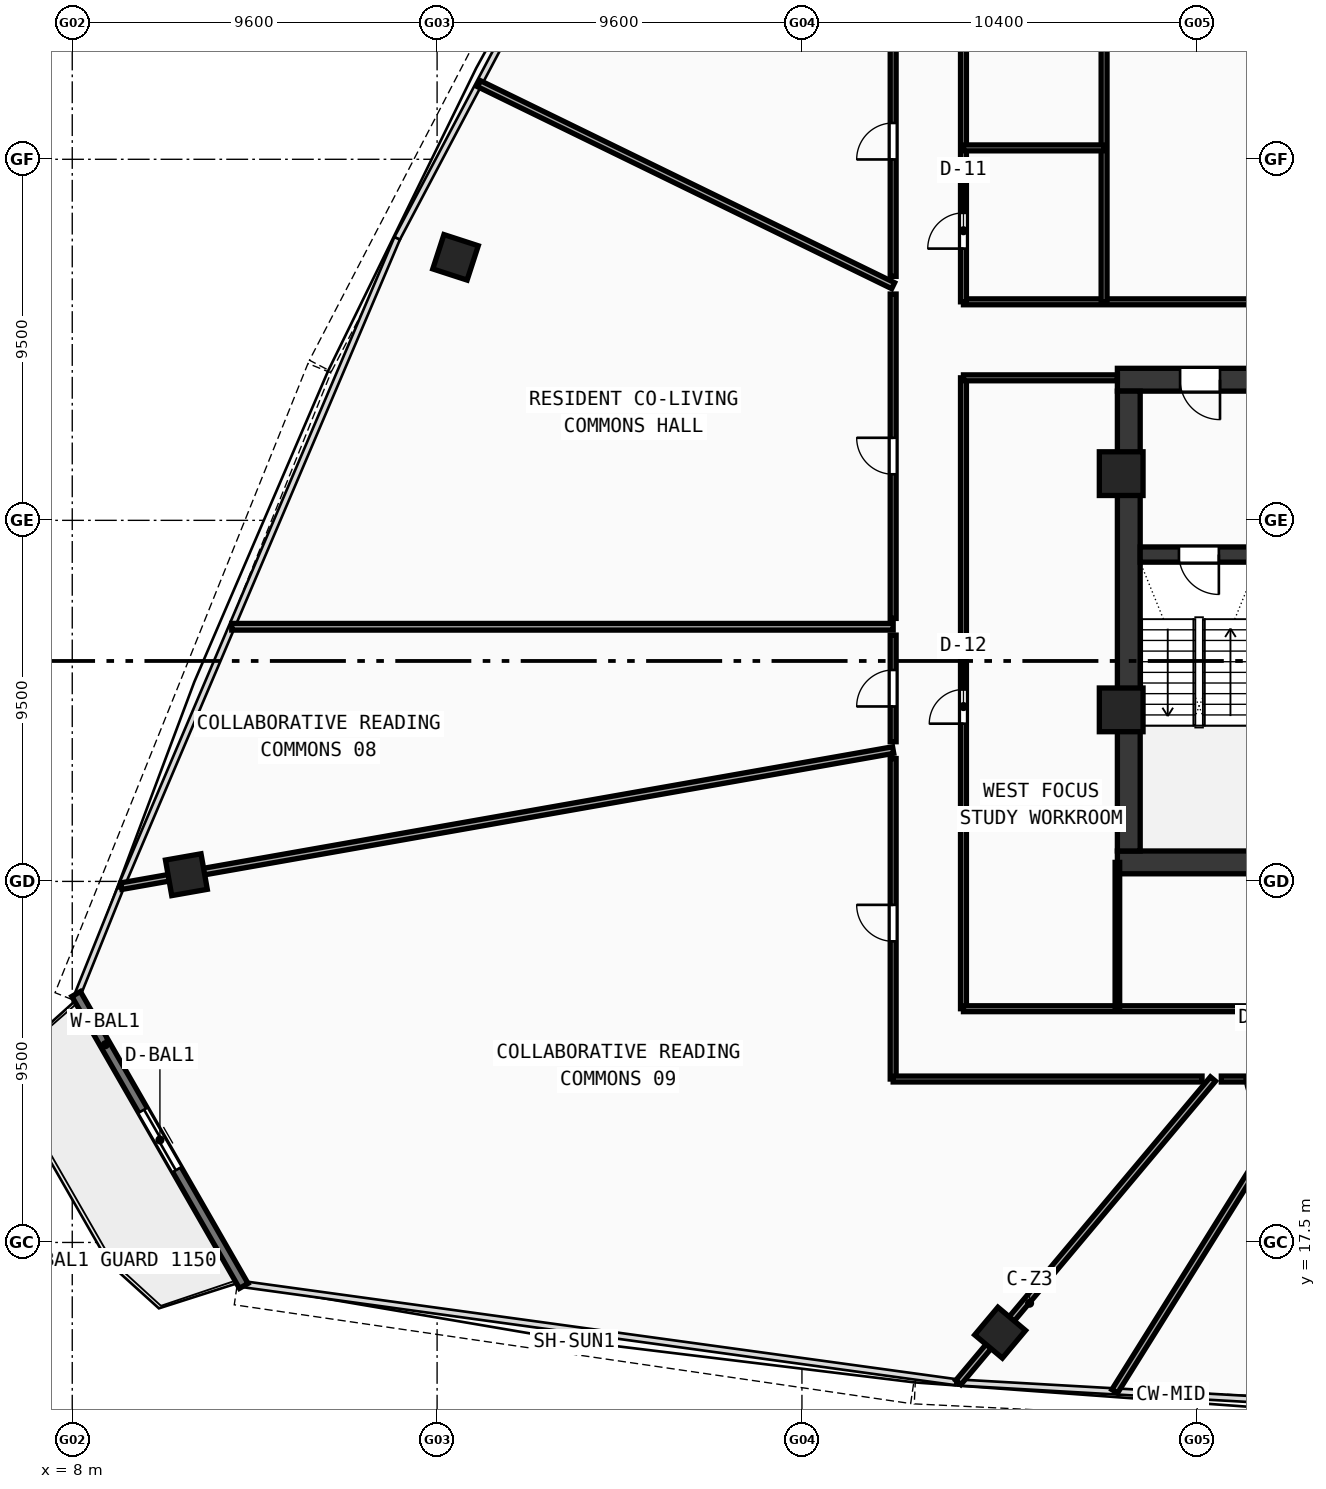
"""IFC4 building model, lengths in metres.
Left out: names, types, materials, properties, quantities, classifications, styles, units other than length and angle.
Written with IfcOpenShell. Run it as: python <this file> out.ifc"""

import sys

from ifc_helpers import new_model, si_unit, direction, frame, frame_2d, origin, origin_with_axes, origin_2d, place, context, subcontext, project, spatial, rectangle, hollow_rectangle, extrude, source, transform, mapped, element, fill, save


model = new_model("IFC4")
c1 = context("Model", 3, precision=1e-05, world=origin(), true_north=direction((0.0, 1.0)))
c2 = subcontext(c1, "Body", "Model", "MODEL_VIEW")
j1 = project(units=[si_unit("LENGTHUNIT", "METRE"), si_unit("PLANEANGLEUNIT", "RADIAN")], contexts=[c1])
p1 = place(None, origin())
s1 = spatial("IfcSite", under=j1, at=p1, CompositionType="ELEMENT")
p2 = place(p1, origin())
s2 = spatial("IfcBuilding", under=s1, at=p2, CompositionType="ELEMENT")
p3 = place(p2, frame((0.0, 0.0, 148.23)))
s3 = spatial("IfcBuildingStorey", under=s2, at=p3, CompositionType="ELEMENT", Elevation=148.23)
p4 = place(p3, frame((35.5, 27.5, 0.0), z_axis=(0.0, 0.0, 1.0), x_axis=(1.0, 0.0, 0.0)))
e1 = element("IfcWall", 1, at=p4, inside=s3, PredefinedType="SHEAR", context=c2, shape_type="SweptSolid", body=[
    extrude(rectangle(XDim=25.0, YDim=0.6, at=frame_2d((12.5, 0.0))), origin(), (0.0, 0.0, 1.0), 3.42),
])
p5 = place(p3, frame((35.5, 40.2, 0.0), z_axis=(0.0, 0.0, 1.0), x_axis=(1.0, 0.0, 0.0)))
e2 = element("IfcWall", 2, at=p5, inside=s3, PredefinedType="SHEAR", context=c2, shape_type="SweptSolid", body=[
    extrude(rectangle(XDim=11.3, YDim=0.6, at=frame_2d((5.65, 0.0))), origin(), (0.0, 0.0, 1.0), 3.42),
])
p6 = place(p5, frame((1.65, 0.0, 0.0)))
e3 = element("IfcOpeningElement", 3, at=p6, cuts=e2, PredefinedType="OPENING", context=c2, shape_type="SweptSolid", body=[
    extrude(rectangle(XDim=1.05, YDim=2.1, at=frame_2d((0.525, 1.05))), frame((0.0, 0.31, 0.0), z_axis=(0.0, -1.0, 0.0), x_axis=(1.0, 0.0, 0.0)), (0.0, 0.0, 1.0), 0.62),
])
p7 = place(p3, frame((35.8, 27.8, 0.0), z_axis=(0.0, 0.0, 1.0), x_axis=(0.0, 1.0, 0.0)))
e4 = element("IfcWall", 4, at=p7, inside=s3, PredefinedType="SHEAR", context=c2, shape_type="SweptSolid", body=[
    extrude(rectangle(XDim=12.1, YDim=0.6, at=frame_2d((6.05, 0.0))), origin(), (0.0, 0.0, 1.0), 3.42),
])
p8 = place(p3, frame((36.1, 35.6, 0.0), z_axis=(0.0, 0.0, 1.0), x_axis=(1.0, 0.0, 0.0)))
e5 = element("IfcWall", 5, at=p8, inside=s3, PredefinedType="SHEAR", context=c2, shape_type="SweptSolid", body=[
    extrude(rectangle(XDim=3.1, YDim=0.4, at=frame_2d((1.55, 0.0))), origin(), (0.0, 0.0, 1.0), 3.42),
])
p9 = place(p8, frame((1.02, 0.0, 0.0)))
e6 = element("IfcOpeningElement", 6, at=p9, cuts=e5, PredefinedType="OPENING", context=c2, shape_type="SweptSolid", body=[
    extrude(rectangle(XDim=1.05, YDim=2.1, at=frame_2d((0.525, 1.05))), frame((0.0, 0.21, 0.0), z_axis=(0.0, -1.0, 0.0), x_axis=(1.0, 0.0, 0.0)), (0.0, 0.0, 1.0), 0.42),
])
m1 = source(origin(), c2, "Body", "SweptSolid", [
    extrude(hollow_rectangle(XDim=1.15, YDim=1.15, WallThickness=0.048, at=origin_2d()), origin(), (0.0, 0.0, 1.0), 3.68),
])
for number, where, z_axis, x_axis in (
    (7, (35.6, 37.729, -0.26), (0.0, 0.0, 1.0), (1.0, 0.0, 0.0)),
    (8, (35.6, 31.513, -0.26), (0.0, 0.0, 1.0), (1.0, 0.0, 0.0)),
):
    element("IfcColumn", number, at=place(p3, frame(where, z_axis=z_axis, x_axis=x_axis)), inside=s3, PredefinedType="COLUMN", context=c2, shape_type="MappedRepresentation", body=[
        mapped(m1, transform((0.0, 0.0, 0.0), scale=1.0)),
    ])
m2 = source(origin(), c2, "Body", "SweptSolid", [
    extrude(hollow_rectangle(XDim=0.95, YDim=0.95, WallThickness=0.04, at=origin_2d()), origin(), (0.0, 0.0, 1.0), 3.68),
])
for number, where, z_axis, x_axis in (
    (9, (32.415, 15.126, -0.26), (0.0, 0.0, 1.0), (0.766, -0.643, 0.0)),
    (10, (18.085, 43.42, -0.26), (0.0, 0.0, 1.0), (-0.309, -0.951, 0.0)),
    (11, (11.003, 27.177, -0.26), (0.0, 0.0, 1.0), (0.174, -0.985, 0.0)),
):
    element("IfcColumn", number, at=place(p3, frame(where, z_axis=z_axis, x_axis=x_axis)), inside=s3, PredefinedType="COLUMN", context=c2, shape_type="MappedRepresentation", body=[
        mapped(m2, transform((0.0, 0.0, 0.0), scale=1.0)),
    ])
p10 = place(p3, frame((8.102, 24.038, 0.0), z_axis=(0.0, 0.0, 1.0), x_axis=(0.497915888941, -0.867225326856, 0.0)))
e12 = element("IfcWall", 12, at=p10, inside=s3, PredefinedType="STANDARD", context=c2, shape_type="SweptSolid", body=[
    extrude(rectangle(XDim=8.858, YDim=0.26, at=frame_2d((4.429, 0.0))), origin(), (0.0, 0.0, 1.0), 3.42),
])
p11 = place(p10, frame((3.529, 0.0, 0.0)))
e13 = element("IfcOpeningElement", 13, at=p11, cuts=e12, PredefinedType="OPENING", context=c2, shape_type="SweptSolid", body=[
    extrude(rectangle(XDim=1.8, YDim=2.15, at=frame_2d((0.9, 1.075))), frame((0.0, 0.14, 0.0), z_axis=(0.0, -1.0, 0.0), x_axis=(1.0, 0.0, 0.0)), (0.0, 0.0, 1.0), 0.28),
])
p12 = place(p3, frame((31.45, 42.25, 0.0), z_axis=(0.0, 0.0, 1.0), x_axis=(1.0, 0.0, 0.0)))
e14 = element("IfcWall", 14, at=p12, inside=s3, PredefinedType="PARTITIONING", context=c2, shape_type="SweptSolid", body=[
    extrude(rectangle(XDim=33.1, YDim=0.155, at=frame_2d((16.55, 0.0))), origin(), (0.0, 0.0, 1.0), 2.77),
])
p13 = place(p3, frame((31.45, 42.25, 0.0), z_axis=(0.0, 0.0, 1.0), x_axis=(0.0, 1.0, 0.0)))
e15 = element("IfcWall", 15, at=p13, inside=s3, PredefinedType="PARTITIONING", context=c2, shape_type="SweptSolid", body=[
    extrude(rectangle(XDim=11.7, YDim=0.155, at=frame_2d((5.85, 0.0))), origin(), (0.0, 0.0, 1.0), 2.77),
])
p14 = place(p13, frame((1.4, 0.0, 0.0)))
e16 = element("IfcOpeningElement", 16, at=p14, cuts=e15, PredefinedType="OPENING", context=c2, shape_type="SweptSolid", body=[
    extrude(rectangle(XDim=0.94, YDim=2.1, at=frame_2d((0.47, 1.05))), frame((0.0, 0.087, 0.0), z_axis=(0.0, -1.0, 0.0), x_axis=(1.0, 0.0, 0.0)), (0.0, 0.0, 1.0), 0.175),
])
p15 = place(p13, frame((6.8, 0.0, 0.0)))
e17 = element("IfcOpeningElement", 17, at=p15, cuts=e15, PredefinedType="OPENING", context=c2, shape_type="SweptSolid", body=[
    extrude(rectangle(XDim=0.92, YDim=2.1, at=frame_2d((0.46, 1.05))), frame((0.0, 0.087, 0.0), z_axis=(0.0, -1.0, 0.0), x_axis=(1.0, 0.0, 0.0)), (0.0, 0.0, 1.0), 0.175),
])
p16 = place(p3, frame((35.15, 42.25, 0.0), z_axis=(0.0, 0.0, 1.0), x_axis=(0.0, 1.0, 0.0)))
e18 = element("IfcWall", 18, at=p16, inside=s3, PredefinedType="PARTITIONING", context=c2, shape_type="SweptSolid", body=[
    extrude(rectangle(XDim=11.7, YDim=0.155, at=frame_2d((5.85, 0.0))), origin(), (0.0, 0.0, 1.0), 2.77),
])
p17 = place(p3, frame((31.45, 46.3, 0.0), z_axis=(0.0, 0.0, 1.0), x_axis=(1.0, 0.0, 0.0)))
e19 = element("IfcWall", 19, at=p17, inside=s3, PredefinedType="PARTITIONING", context=c2, shape_type="SweptSolid", body=[
    extrude(rectangle(XDim=3.7, YDim=0.155, at=frame_2d((1.85, 0.0))), origin(), (0.0, 0.0, 1.0), 2.77),
])
p18 = place(p3, frame((31.45, 23.65, 0.0), z_axis=(0.0, 0.0, 1.0), x_axis=(0.0, 1.0, 0.0)))
e20 = element("IfcWall", 20, at=p18, inside=s3, PredefinedType="PARTITIONING", context=c2, shape_type="SweptSolid", body=[
    extrude(rectangle(XDim=16.6, YDim=0.155, at=frame_2d((8.3, 0.0))), origin(), (0.0, 0.0, 1.0), 2.77),
])
p19 = place(p18, frame((7.5, 0.0, 0.0)))
e21 = element("IfcOpeningElement", 21, at=p19, cuts=e20, PredefinedType="OPENING", context=c2, shape_type="SweptSolid", body=[
    extrude(rectangle(XDim=0.9, YDim=2.08, at=frame_2d((0.45, 1.04))), frame((0.0, 0.087, 0.0), z_axis=(0.0, -1.0, 0.0), x_axis=(1.0, 0.0, 0.0)), (0.0, 0.0, 1.0), 0.175),
])
p20 = place(p3, frame((31.45, 23.65, 0.0), z_axis=(0.0, 0.0, 1.0), x_axis=(1.0, 0.0, 0.0)))
e22 = element("IfcWall", 22, at=p20, inside=s3, PredefinedType="PARTITIONING", context=c2, shape_type="SweptSolid", body=[
    extrude(rectangle(XDim=33.1, YDim=0.155, at=frame_2d((16.55, 0.0))), origin(), (0.0, 0.0, 1.0), 2.77),
])
p21 = place(p20, frame((16.0, 0.0, 0.0)))
e23 = element("IfcOpeningElement", 23, at=p21, cuts=e22, PredefinedType="OPENING", context=c2, shape_type="SweptSolid", body=[
    extrude(rectangle(XDim=0.92, YDim=2.1, at=frame_2d((0.46, 1.05))), frame((0.0, 0.087, 0.0), z_axis=(0.0, -1.0, 0.0), x_axis=(1.0, 0.0, 0.0)), (0.0, 0.0, 1.0), 0.175),
])
p22 = place(p3, frame((31.45, 40.25, 0.0), z_axis=(0.0, 0.0, 1.0), x_axis=(1.0, 0.0, 0.0)))
e24 = element("IfcWall", 24, at=p22, inside=s3, PredefinedType="PARTITIONING", context=c2, shape_type="SweptSolid", body=[
    extrude(rectangle(XDim=4.05, YDim=0.155, at=frame_2d((2.025, 0.0))), origin(), (0.0, 0.0, 1.0), 3.42),
])
p23 = place(p3, frame((35.5, 23.65, 0.0), z_axis=(0.0, 0.0, 1.0), x_axis=(0.0, 1.0, 0.0)))
e25 = element("IfcWall", 25, at=p23, inside=s3, PredefinedType="PARTITIONING", context=c2, shape_type="SweptSolid", body=[
    extrude(rectangle(XDim=3.85, YDim=0.12, at=frame_2d((1.925, 0.0))), origin(), (0.0, 0.0, 1.0), 3.02),
])
p24 = place(p3, frame((29.6, 42.674, 0.0), z_axis=(0.0, 0.0, 1.0), x_axis=(-0.898797277455, 0.438364521875, 0.0)))
e26 = element("IfcWall", 26, at=p24, inside=s3, PredefinedType="PARTITIONING", context=c2, shape_type="SweptSolid", body=[
    extrude(rectangle(XDim=12.125, YDim=0.175, at=frame_2d((6.062, 0.0))), origin(), (0.0, 0.0, 1.0), 2.77),
])
p25 = place(p3, frame((29.6, 33.7, 0.0), z_axis=(0.0, 0.0, 1.0), x_axis=(-1.0, 0.0, 0.0)))
e27 = element("IfcWall", 27, at=p25, inside=s3, PredefinedType="PARTITIONING", context=c2, shape_type="SweptSolid", body=[
    extrude(rectangle(XDim=17.403, YDim=0.175, at=frame_2d((8.702, 0.0))), origin(), (0.0, 0.0, 1.0), 2.77),
])
p26 = place(p3, frame((29.6, 30.456, 0.0), z_axis=(0.0, 0.0, 1.0), x_axis=(-0.984807623882, -0.173648909998, 0.0)))
e28 = element("IfcWall", 28, at=p26, inside=s3, PredefinedType="PARTITIONING", context=c2, shape_type="SweptSolid", body=[
    extrude(rectangle(XDim=20.622, YDim=0.175, at=frame_2d((10.311, 0.0))), origin(), (0.0, 0.0, 1.0), 2.77),
])
p27 = place(p3, frame((38.015, 21.8, 0.0), z_axis=(0.0, 0.0, 1.0), x_axis=(-0.642781677101, -0.76604942111, 0.0)))
e29 = element("IfcWall", 29, at=p27, inside=s3, PredefinedType="PARTITIONING", context=c2, shape_type="SweptSolid", body=[
    extrude(rectangle(XDim=10.424, YDim=0.175, at=frame_2d((5.212, 0.0))), origin(), (0.0, 0.0, 1.0), 2.77),
])
p28 = place(p3, frame((40.564, 21.8, 0.0), z_axis=(0.0, 0.0, 1.0), x_axis=(-0.529931002604, -0.848040761096, 0.0)))
e30 = element("IfcWall", 30, at=p28, inside=s3, PredefinedType="PARTITIONING", context=c2, shape_type="SweptSolid", body=[
    extrude(rectangle(XDim=9.691, YDim=0.175, at=frame_2d((4.845, 0.0))), origin(), (0.0, 0.0, 1.0), 2.77),
])
p29 = place(p3, frame((29.6, 21.8, 0.0), z_axis=(0.0, 0.0, 1.0), x_axis=(0.0, 1.0, 0.0)))
e31 = element("IfcWall", 31, at=p29, inside=s3, PredefinedType="PARTITIONING", context=c2, shape_type="SweptSolid", body=[
    extrude(rectangle(XDim=8.432, YDim=0.155, at=frame_2d((4.216, 0.0))), origin(), (0.0, 0.0, 1.0), 3.02),
])
p30 = place(p29, frame((3.623, 0.0, 0.0)))
e32 = element("IfcOpeningElement", 32, at=p30, cuts=e31, PredefinedType="OPENING", context=c2, shape_type="SweptSolid", body=[
    extrude(rectangle(XDim=0.96, YDim=2.12, at=frame_2d((0.48, 1.06))), frame((0.0, 0.087, 0.0), z_axis=(0.0, -1.0, 0.0), x_axis=(1.0, 0.0, 0.0)), (0.0, 0.0, 1.0), 0.175),
])
p31 = place(p3, frame((29.6, 30.675, 0.0), z_axis=(0.0, 0.0, 1.0), x_axis=(0.0, 1.0, 0.0)))
e33 = element("IfcWall", 33, at=p31, inside=s3, PredefinedType="PARTITIONING", context=c2, shape_type="SweptSolid", body=[
    extrude(rectangle(XDim=2.805, YDim=0.155, at=frame_2d((1.402, 0.0))), origin(), (0.0, 0.0, 1.0), 3.42),
])
p32 = place(p31, frame((0.927, 0.0, 0.0)))
e34 = element("IfcOpeningElement", 34, at=p32, cuts=e33, PredefinedType="OPENING", context=c2, shape_type="SweptSolid", body=[
    extrude(rectangle(XDim=0.96, YDim=2.12, at=frame_2d((0.48, 1.06))), frame((0.0, 0.087, 0.0), z_axis=(0.0, -1.0, 0.0), x_axis=(1.0, 0.0, 0.0)), (0.0, 0.0, 1.0), 0.175),
])
p33 = place(p3, frame((29.6, 33.92, 0.0), z_axis=(0.0, 0.0, 1.0), x_axis=(0.0, 1.0, 0.0)))
e35 = element("IfcWall", 35, at=p33, inside=s3, PredefinedType="PARTITIONING", context=c2, shape_type="SweptSolid", body=[
    extrude(rectangle(XDim=8.535, YDim=0.155, at=frame_2d((4.267, 0.0))), origin(), (0.0, 0.0, 1.0), 2.77),
])
p34 = place(p33, frame((3.792, 0.0, 0.0)))
e36 = element("IfcOpeningElement", 36, at=p34, cuts=e35, PredefinedType="OPENING", context=c2, shape_type="SweptSolid", body=[
    extrude(rectangle(XDim=0.96, YDim=2.12, at=frame_2d((0.48, 1.06))), frame((0.0, 0.087, 0.0), z_axis=(0.0, -1.0, 0.0), x_axis=(1.0, 0.0, 0.0)), (0.0, 0.0, 1.0), 0.175),
])
p35 = place(p3, frame((29.6, 42.919, 0.0), z_axis=(0.0, 0.0, 1.0), x_axis=(0.0, 1.0, 0.0)))
e37 = element("IfcWall", 37, at=p35, inside=s3, PredefinedType="PARTITIONING", context=c2, shape_type="SweptSolid", body=[
    extrude(rectangle(XDim=7.128, YDim=0.155, at=frame_2d((3.564, 0.0))), origin(), (0.0, 0.0, 1.0), 2.77),
])
p36 = place(p35, frame((3.077, 0.0, 0.0)))
e38 = element("IfcOpeningElement", 38, at=p36, cuts=e37, PredefinedType="OPENING", context=c2, shape_type="SweptSolid", body=[
    extrude(rectangle(XDim=0.96, YDim=2.12, at=frame_2d((0.48, 1.06))), frame((0.0, 0.087, 0.0), z_axis=(0.0, -1.0, 0.0), x_axis=(1.0, 0.0, 0.0)), (0.0, 0.0, 1.0), 0.175),
])
p37 = place(p3, frame((40.305, 21.8, 0.0), z_axis=(0.0, 0.0, 1.0), x_axis=(-1.0, 0.0, 0.0)))
e39 = element("IfcWall", 39, at=p37, inside=s3, PredefinedType="PARTITIONING", context=c2, shape_type="SweptSolid", body=[
    extrude(rectangle(XDim=2.07, YDim=0.155, at=frame_2d((1.035, 0.0))), origin(), (0.0, 0.0, 1.0), 2.77),
])
p38 = place(p37, frame((0.555, 0.0, 0.0)))
e40 = element("IfcOpeningElement", 40, at=p38, cuts=e39, PredefinedType="OPENING", context=c2, shape_type="SweptSolid", body=[
    extrude(rectangle(XDim=0.9, YDim=2.08, at=frame_2d((0.45, 1.04))), frame((0.0, 0.087, 0.0), z_axis=(0.0, -1.0, 0.0), x_axis=(1.0, 0.0, 0.0)), (0.0, 0.0, 1.0), 0.175),
])
p39 = place(p3, frame((37.728, 21.8, 0.0), z_axis=(0.0, 0.0, 1.0), x_axis=(-1.0, 0.0, 0.0)))
e41 = element("IfcWall", 41, at=p39, inside=s3, PredefinedType="PARTITIONING", context=c2, shape_type="SweptSolid", body=[
    extrude(rectangle(XDim=8.127, YDim=0.155, at=frame_2d((4.064, 0.0))), origin(), (0.0, 0.0, 1.0), 3.02),
])
m3 = source(origin(), c2, "Body", "SweptSolid", [
    extrude(rectangle(XDim=1.8, YDim=2.15, at=frame_2d((0.9, 1.075))), frame((0.0, 0.025, 0.0), z_axis=(0.0, -1.0, 0.0), x_axis=(1.0, 0.0, 0.0)), (0.0, 0.0, 1.0), 0.05),
])
p40 = place(p11, origin_with_axes())
e42 = element("IfcDoor", 42, at=p40, inside=s3, OperationType="DOUBLE_DOOR_SLIDING", PredefinedType="DOOR", context=c2, shape_type="MappedRepresentation", body=[
    mapped(m3, transform((0.0, 0.0, 0.0), scale=1.0)),
])
fill(e13, e42)
m4 = source(origin(), c2, "Body", "SweptSolid", [
    extrude(rectangle(XDim=1.05, YDim=2.1, at=frame_2d((0.525, 1.05))), frame((0.0, 0.025, 0.0), z_axis=(0.0, -1.0, 0.0), x_axis=(1.0, 0.0, 0.0)), (0.0, 0.0, 1.0), 0.05),
])
p41 = place(p9, frame((1.05, 0.0, 0.0), z_axis=(0.0, 0.0, 1.0), x_axis=(-1.0, 0.0, 0.0)))
e43 = element("IfcDoor", 43, at=p41, inside=s3, OperationType="SINGLE_SWING_LEFT", PredefinedType="DOOR", context=c2, shape_type="MappedRepresentation", body=[
    mapped(m4, transform((0.0, 0.0, 0.0), scale=1.0)),
])
fill(e6, e43)
p42 = place(p6, frame((1.05, 0.0, 0.0), z_axis=(0.0, 0.0, 1.0), x_axis=(-1.0, 0.0, 0.0)))
e44 = element("IfcDoor", 44, at=p42, inside=s3, OperationType="SINGLE_SWING_LEFT", PredefinedType="DOOR", context=c2, shape_type="MappedRepresentation", body=[
    mapped(m4, transform((0.0, 0.0, 0.0), scale=1.0)),
])
fill(e3, e44)
m5 = source(origin(), c2, "Body", "SweptSolid", [
    extrude(rectangle(XDim=0.94, YDim=2.1, at=frame_2d((0.47, 1.05))), frame((0.0, 0.025, 0.0), z_axis=(0.0, -1.0, 0.0), x_axis=(1.0, 0.0, 0.0)), (0.0, 0.0, 1.0), 0.05),
])
p43 = place(p14, origin_with_axes())
e45 = element("IfcDoor", 45, at=p43, inside=s3, OperationType="SINGLE_SWING_LEFT", PredefinedType="DOOR", context=c2, shape_type="MappedRepresentation", body=[
    mapped(m5, transform((0.0, 0.0, 0.0), scale=1.0)),
])
fill(e16, e45)
m6 = source(origin(), c2, "Body", "SweptSolid", [
    extrude(rectangle(XDim=0.9, YDim=2.08, at=frame_2d((0.45, 1.04))), frame((0.0, 0.025, 0.0), z_axis=(0.0, -1.0, 0.0), x_axis=(1.0, 0.0, 0.0)), (0.0, 0.0, 1.0), 0.05),
])
p44 = place(p19, origin_with_axes())
e46 = element("IfcDoor", 46, at=p44, inside=s3, OperationType="SINGLE_SWING_LEFT", PredefinedType="DOOR", context=c2, shape_type="MappedRepresentation", body=[
    mapped(m6, transform((0.0, 0.0, 0.0), scale=1.0)),
])
fill(e21, e46)
m7 = source(origin(), c2, "Body", "SweptSolid", [
    extrude(rectangle(XDim=0.96, YDim=2.12, at=frame_2d((0.48, 1.06))), frame((0.0, 0.025, 0.0), z_axis=(0.0, -1.0, 0.0), x_axis=(1.0, 0.0, 0.0)), (0.0, 0.0, 1.0), 0.05),
])
p45 = place(p36, origin_with_axes())
e47 = element("IfcDoor", 47, at=p45, inside=s3, OperationType="SINGLE_SWING_LEFT", PredefinedType="DOOR", context=c2, shape_type="MappedRepresentation", body=[
    mapped(m7, transform((0.0, 0.0, 0.0), scale=1.0)),
])
fill(e38, e47)
p46 = place(p34, origin_with_axes())
e48 = element("IfcDoor", 48, at=p46, inside=s3, OperationType="SINGLE_SWING_RIGHT", PredefinedType="DOOR", context=c2, shape_type="MappedRepresentation", body=[
    mapped(m7, transform((0.0, 0.0, 0.0), scale=1.0)),
])
fill(e36, e48)
p47 = place(p32, origin_with_axes())
e49 = element("IfcDoor", 49, at=p47, inside=s3, OperationType="SINGLE_SWING_LEFT", PredefinedType="DOOR", context=c2, shape_type="MappedRepresentation", body=[
    mapped(m7, transform((0.0, 0.0, 0.0), scale=1.0)),
])
fill(e34, e49)
p48 = place(p30, origin_with_axes())
e50 = element("IfcDoor", 50, at=p48, inside=s3, OperationType="SINGLE_SWING_RIGHT", PredefinedType="DOOR", context=c2, shape_type="MappedRepresentation", body=[
    mapped(m7, transform((0.0, 0.0, 0.0), scale=1.0)),
])
fill(e32, e50)
p49 = place(p38, origin_with_axes())
e51 = element("IfcDoor", 51, at=p49, inside=s3, OperationType="SINGLE_SWING_LEFT", PredefinedType="DOOR", context=c2, shape_type="MappedRepresentation", body=[
    mapped(m6, transform((0.0, 0.0, 0.0), scale=1.0)),
])
fill(e40, e51)
save(model, sys.argv[1])
